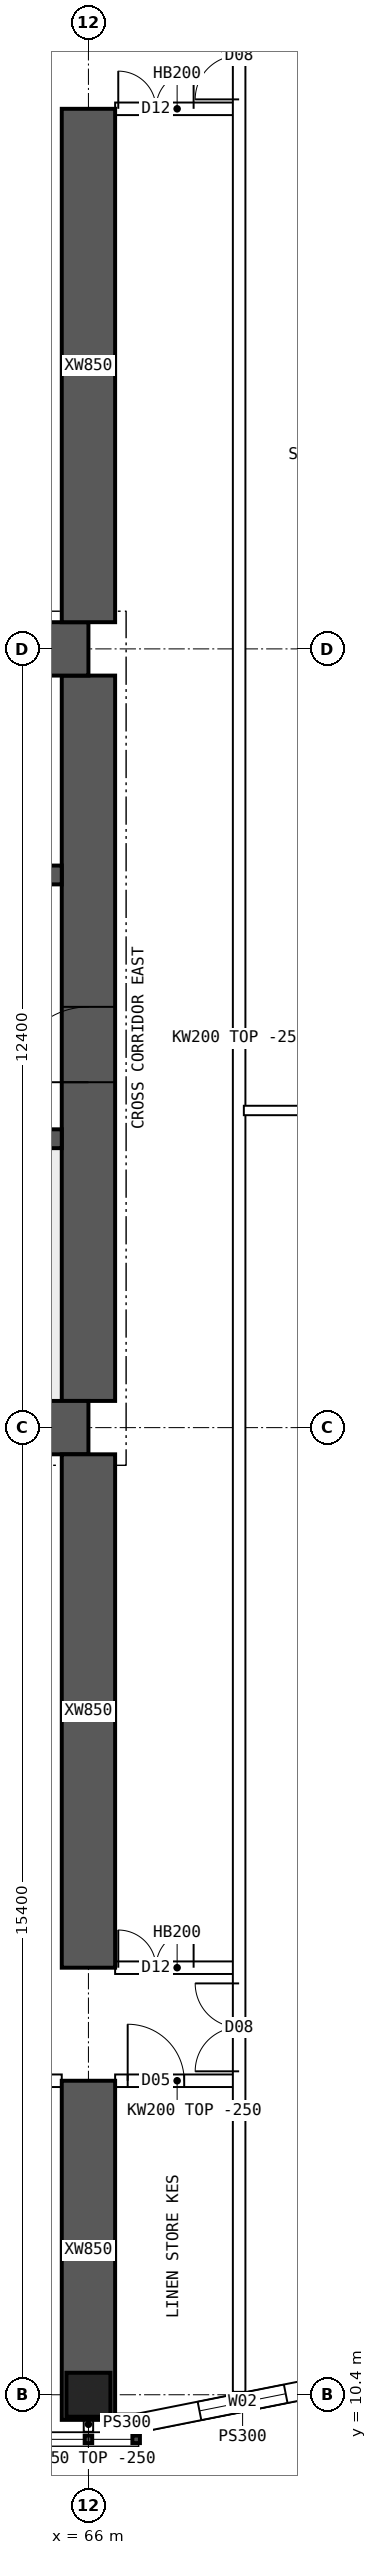
"""IFC4 building model, lengths in metres.
Left out: names, types, materials, properties, quantities, classifications, styles, units other than length and angle.
Written with IfcOpenShell. Run it as: python <this file> out.ifc"""

import sys

from ifc_helpers import new_model, si_unit, direction, frame, frame_2d, origin, origin_2d, place, context, subcontext, project, spatial, polyline, rectangle, hollow_rectangle, outline, extrude, element, fill, save


model = new_model("IFC4")
c1 = context("Model", 3, precision=1e-05, world=origin(), true_north=direction((0.0, 1.0)))
c2 = subcontext(c1, "Body", "Model", "MODEL_VIEW")
j1 = project(units=[si_unit("LENGTHUNIT", "METRE"), si_unit("PLANEANGLEUNIT", "RADIAN")], contexts=[c1])
p1 = place(None, origin())
s1 = spatial("IfcSite", under=j1, at=p1, CompositionType="ELEMENT")
p2 = place(p1, origin())
s2 = spatial("IfcBuilding", under=s1, at=p2, CompositionType="ELEMENT")
p3 = place(p2, frame((0.0, 0.0, 186.1)))
s3 = spatial("IfcBuildingStorey", under=s2, at=p3, CompositionType="ELEMENT", Elevation=186.1)
p4 = place(p3, frame((66.0, 10.4, 0.0), z_axis=(0.0, 0.0, 1.0), x_axis=(1.0, 0.0, 0.0)))
e1 = element("IfcColumn", 1, at=p4, inside=s3, PredefinedType="COLUMN", context=c2, shape_type="SweptSolid", body=[
    extrude(hollow_rectangle(XDim=0.7, YDim=0.7, WallThickness=0.07, at=origin_2d()), origin(), (0.0, 0.0, 1.0), 3.75),
])
for number, where, z_axis, x_axis in (
    (2, (18.0, 25.8, 0.0), (0.0, 0.0, 1.0), (1.0, 0.0, 0.0)),
    (3, (18.0, 38.2, 0.0), (0.0, 0.0, 1.0), (1.0, 0.0, 0.0)),
):
    element("IfcWall", number, at=place(p3, frame(where, z_axis=z_axis, x_axis=x_axis)), inside=s3, PredefinedType="SHEAR", context=c2, shape_type="SweptSolid", body=[
        extrude(rectangle(XDim=48.0, YDim=0.85, at=frame_2d((24.0, 0.0))), origin(), (0.0, 0.0, 1.0), 3.75),
    ])
p5 = place(p3, frame((66.0, 26.225, 0.0), z_axis=(0.0, 0.0, 1.0), x_axis=(0.0, 1.0, 0.0)))
e4 = element("IfcWall", 4, at=p5, inside=s3, PredefinedType="SHEAR", context=c2, shape_type="SweptSolid", body=[
    extrude(rectangle(XDim=11.55, YDim=0.85, at=frame_2d((5.775, 0.0))), origin(), (0.0, 0.0, 1.0), 3.75),
])
p6 = place(p5, frame((5.075, 0.0, 0.0)))
e5 = element("IfcOpeningElement", 5, at=p6, cuts=e4, PredefinedType="OPENING", context=c2, shape_type="SweptSolid", body=[
    extrude(rectangle(XDim=1.2, YDim=2.1, at=frame_2d((0.6, 1.05))), frame((0.0, 0.435, 0.0), z_axis=(0.0, -1.0, 0.0), x_axis=(1.0, 0.0, 0.0)), (0.0, 0.0, 1.0), 0.87),
])
p7 = place(p3, frame((18.425, 30.4, 0.0), z_axis=(0.0, 0.0, 1.0), x_axis=(1.0, 0.0, 0.0)))
e6 = element("IfcWall", 6, at=p7, inside=s3, PredefinedType="SHEAR", context=c2, shape_type="SweptSolid", body=[
    extrude(rectangle(XDim=47.15, YDim=0.3, at=frame_2d((23.575, 0.0))), origin(), (0.0, 0.0, 1.0), 3.75),
])
p8 = place(p7, frame((0.4, 0.0, 0.0)))
e7 = element("IfcOpeningElement", 7, at=p8, cuts=e6, PredefinedType="OPENING", context=c2, shape_type="SweptSolid", body=[
    extrude(rectangle(XDim=1.0, YDim=2.1, at=frame_2d((0.5, 1.05))), frame((0.0, 0.16, 0.0), z_axis=(0.0, -1.0, 0.0), x_axis=(1.0, 0.0, 0.0)), (0.0, 0.0, 1.0), 0.32),
])
p9 = place(p7, frame((45.75, 0.0, 0.0)))
e8 = element("IfcOpeningElement", 8, at=p9, cuts=e6, PredefinedType="OPENING", context=c2, shape_type="SweptSolid", body=[
    extrude(rectangle(XDim=1.0, YDim=2.1, at=frame_2d((0.5, 1.05))), frame((0.0, 0.16, 0.0), z_axis=(0.0, -1.0, 0.0), x_axis=(1.0, 0.0, 0.0)), (0.0, 0.0, 1.0), 0.32),
])
p10 = place(p7, frame((8.325, 0.0, 0.0)))
e9 = element("IfcOpeningElement", 9, at=p10, cuts=e6, PredefinedType="OPENING", context=c2, shape_type="SweptSolid", body=[
    extrude(rectangle(XDim=1.1, YDim=2.1, at=frame_2d((0.55, 1.05))), frame((0.0, 0.16, 0.0), z_axis=(0.0, -1.0, 0.0), x_axis=(1.0, 0.0, 0.0)), (0.0, 0.0, 1.0), 0.32),
])
p11 = place(p7, frame((10.925, 0.0, 0.0)))
e10 = element("IfcOpeningElement", 10, at=p11, cuts=e6, PredefinedType="OPENING", context=c2, shape_type="SweptSolid", body=[
    extrude(rectangle(XDim=1.1, YDim=2.1, at=frame_2d((0.55, 1.05))), frame((0.0, 0.16, 0.0), z_axis=(0.0, -1.0, 0.0), x_axis=(1.0, 0.0, 0.0)), (0.0, 0.0, 1.0), 0.32),
])
p12 = place(p7, frame((13.525, 0.0, 0.0)))
e11 = element("IfcOpeningElement", 11, at=p12, cuts=e6, PredefinedType="OPENING", context=c2, shape_type="SweptSolid", body=[
    extrude(rectangle(XDim=1.1, YDim=2.1, at=frame_2d((0.55, 1.05))), frame((0.0, 0.16, 0.0), z_axis=(0.0, -1.0, 0.0), x_axis=(1.0, 0.0, 0.0)), (0.0, 0.0, 1.0), 0.32),
])
p13 = place(p7, frame((16.125, 0.0, 0.0)))
e12 = element("IfcOpeningElement", 12, at=p13, cuts=e6, PredefinedType="OPENING", context=c2, shape_type="SweptSolid", body=[
    extrude(rectangle(XDim=1.1, YDim=2.1, at=frame_2d((0.55, 1.05))), frame((0.0, 0.16, 0.0), z_axis=(0.0, -1.0, 0.0), x_axis=(1.0, 0.0, 0.0)), (0.0, 0.0, 1.0), 0.32),
])
p14 = place(p7, frame((18.9, 0.0, 0.0)))
e13 = element("IfcOpeningElement", 13, at=p14, cuts=e6, PredefinedType="OPENING", context=c2, shape_type="SweptSolid", body=[
    extrude(rectangle(XDim=0.9, YDim=2.1, at=frame_2d((0.45, 1.05))), frame((0.0, 0.16, 0.0), z_axis=(0.0, -1.0, 0.0), x_axis=(1.0, 0.0, 0.0)), (0.0, 0.0, 1.0), 0.32),
])
p15 = place(p7, frame((30.192, 0.0, 0.0)))
e14 = element("IfcOpeningElement", 14, at=p15, cuts=e6, PredefinedType="OPENING", context=c2, shape_type="SweptSolid", body=[
    extrude(rectangle(XDim=1.1, YDim=2.1, at=frame_2d((0.55, 1.05))), frame((0.0, 0.16, 0.0), z_axis=(0.0, -1.0, 0.0), x_axis=(1.0, 0.0, 0.0)), (0.0, 0.0, 1.0), 0.32),
])
p16 = place(p7, frame((33.725, 0.0, 0.0)))
e15 = element("IfcOpeningElement", 15, at=p16, cuts=e6, PredefinedType="OPENING", context=c2, shape_type="SweptSolid", body=[
    extrude(rectangle(XDim=1.1, YDim=2.1, at=frame_2d((0.55, 1.05))), frame((0.0, 0.16, 0.0), z_axis=(0.0, -1.0, 0.0), x_axis=(1.0, 0.0, 0.0)), (0.0, 0.0, 1.0), 0.32),
])
p17 = place(p7, frame((37.258, 0.0, 0.0)))
e16 = element("IfcOpeningElement", 16, at=p17, cuts=e6, PredefinedType="OPENING", context=c2, shape_type="SweptSolid", body=[
    extrude(rectangle(XDim=1.1, YDim=2.1, at=frame_2d((0.55, 1.05))), frame((0.0, 0.16, 0.0), z_axis=(0.0, -1.0, 0.0), x_axis=(1.0, 0.0, 0.0)), (0.0, 0.0, 1.0), 0.32),
])
p18 = place(p3, frame((18.425, 34.6, 0.0), z_axis=(0.0, 0.0, 1.0), x_axis=(1.0, 0.0, 0.0)))
e17 = element("IfcWall", 17, at=p18, inside=s3, PredefinedType="SHEAR", context=c2, shape_type="SweptSolid", body=[
    extrude(rectangle(XDim=47.15, YDim=0.3, at=frame_2d((23.575, 0.0))), origin(), (0.0, 0.0, 1.0), 3.75),
])
p19 = place(p18, frame((0.9, 0.0, 0.0)))
e18 = element("IfcOpeningElement", 18, at=p19, cuts=e17, PredefinedType="OPENING", context=c2, shape_type="SweptSolid", body=[
    extrude(rectangle(XDim=1.1, YDim=2.1, at=frame_2d((0.55, 1.05))), frame((0.0, 0.16, 0.0), z_axis=(0.0, -1.0, 0.0), x_axis=(1.0, 0.0, 0.0)), (0.0, 0.0, 1.0), 0.32),
])
p20 = place(p18, frame((45.15, 0.0, 0.0)))
e19 = element("IfcOpeningElement", 19, at=p20, cuts=e17, PredefinedType="OPENING", context=c2, shape_type="SweptSolid", body=[
    extrude(rectangle(XDim=1.1, YDim=2.1, at=frame_2d((0.55, 1.05))), frame((0.0, 0.16, 0.0), z_axis=(0.0, -1.0, 0.0), x_axis=(1.0, 0.0, 0.0)), (0.0, 0.0, 1.0), 0.32),
])
p21 = place(p18, frame((4.175, 0.0, 0.0)))
e20 = element("IfcOpeningElement", 20, at=p21, cuts=e17, PredefinedType="OPENING", context=c2, shape_type="SweptSolid", body=[
    extrude(rectangle(XDim=0.9, YDim=2.1, at=frame_2d((0.45, 1.05))), frame((0.0, 0.16, 0.0), z_axis=(0.0, -1.0, 0.0), x_axis=(1.0, 0.0, 0.0)), (0.0, 0.0, 1.0), 0.32),
])
p22 = place(p18, frame((42.075, 0.0, 0.0)))
e21 = element("IfcOpeningElement", 21, at=p22, cuts=e17, PredefinedType="OPENING", context=c2, shape_type="SweptSolid", body=[
    extrude(rectangle(XDim=0.9, YDim=2.1, at=frame_2d((0.45, 1.05))), frame((0.0, 0.16, 0.0), z_axis=(0.0, -1.0, 0.0), x_axis=(1.0, 0.0, 0.0)), (0.0, 0.0, 1.0), 0.32),
])
p23 = place(p18, frame((8.95, 0.0, 0.0)))
e22 = element("IfcOpeningElement", 22, at=p23, cuts=e17, PredefinedType="OPENING", context=c2, shape_type="SweptSolid", body=[
    extrude(rectangle(XDim=0.9, YDim=2.1, at=frame_2d((0.45, 1.05))), frame((0.0, 0.16, 0.0), z_axis=(0.0, -1.0, 0.0), x_axis=(1.0, 0.0, 0.0)), (0.0, 0.0, 1.0), 0.32),
])
p24 = place(p18, frame((12.924, 0.0, 0.0)))
e23 = element("IfcOpeningElement", 23, at=p24, cuts=e17, PredefinedType="OPENING", context=c2, shape_type="SweptSolid", body=[
    extrude(rectangle(XDim=0.9, YDim=2.1, at=frame_2d((0.45, 1.05))), frame((0.0, 0.16, 0.0), z_axis=(0.0, -1.0, 0.0), x_axis=(1.0, 0.0, 0.0)), (0.0, 0.0, 1.0), 0.32),
])
p25 = place(p18, frame((16.571, 0.0, 0.0)))
e24 = element("IfcOpeningElement", 24, at=p25, cuts=e17, PredefinedType="OPENING", context=c2, shape_type="SweptSolid", body=[
    extrude(rectangle(XDim=0.9, YDim=2.1, at=frame_2d((0.45, 1.05))), frame((0.0, 0.16, 0.0), z_axis=(0.0, -1.0, 0.0), x_axis=(1.0, 0.0, 0.0)), (0.0, 0.0, 1.0), 0.32),
])
p26 = place(p18, frame((20.33, 0.0, 0.0)))
e25 = element("IfcOpeningElement", 25, at=p26, cuts=e17, PredefinedType="OPENING", context=c2, shape_type="SweptSolid", body=[
    extrude(rectangle(XDim=0.9, YDim=2.1, at=frame_2d((0.45, 1.05))), frame((0.0, 0.16, 0.0), z_axis=(0.0, -1.0, 0.0), x_axis=(1.0, 0.0, 0.0)), (0.0, 0.0, 1.0), 0.32),
])
p27 = place(p18, frame((24.736, 0.0, 0.0)))
e26 = element("IfcOpeningElement", 26, at=p27, cuts=e17, PredefinedType="OPENING", context=c2, shape_type="SweptSolid", body=[
    extrude(rectangle(XDim=0.9, YDim=2.1, at=frame_2d((0.45, 1.05))), frame((0.0, 0.16, 0.0), z_axis=(0.0, -1.0, 0.0), x_axis=(1.0, 0.0, 0.0)), (0.0, 0.0, 1.0), 0.32),
])
p28 = place(p18, frame((27.533, 0.0, 0.0)))
e27 = element("IfcOpeningElement", 27, at=p28, cuts=e17, PredefinedType="OPENING", context=c2, shape_type="SweptSolid", body=[
    extrude(rectangle(XDim=0.9, YDim=2.1, at=frame_2d((0.45, 1.05))), frame((0.0, 0.16, 0.0), z_axis=(0.0, -1.0, 0.0), x_axis=(1.0, 0.0, 0.0)), (0.0, 0.0, 1.0), 0.32),
])
p29 = place(p18, frame((30.716, 0.0, 0.0)))
e28 = element("IfcOpeningElement", 28, at=p29, cuts=e17, PredefinedType="OPENING", context=c2, shape_type="SweptSolid", body=[
    extrude(rectangle(XDim=0.9, YDim=2.1, at=frame_2d((0.45, 1.05))), frame((0.0, 0.16, 0.0), z_axis=(0.0, -1.0, 0.0), x_axis=(1.0, 0.0, 0.0)), (0.0, 0.0, 1.0), 0.32),
])
p30 = place(p18, frame((34.667, 0.0, 0.0)))
e29 = element("IfcOpeningElement", 29, at=p30, cuts=e17, PredefinedType="OPENING", context=c2, shape_type="SweptSolid", body=[
    extrude(rectangle(XDim=0.9, YDim=2.1, at=frame_2d((0.45, 1.05))), frame((0.0, 0.16, 0.0), z_axis=(0.0, -1.0, 0.0), x_axis=(1.0, 0.0, 0.0)), (0.0, 0.0, 1.0), 0.32),
])
p31 = place(p18, frame((37.605, 0.0, 0.0)))
e30 = element("IfcOpeningElement", 30, at=p31, cuts=e17, PredefinedType="OPENING", context=c2, shape_type="SweptSolid", body=[
    extrude(rectangle(XDim=0.9, YDim=2.1, at=frame_2d((0.45, 1.05))), frame((0.0, 0.16, 0.0), z_axis=(0.0, -1.0, 0.0), x_axis=(1.0, 0.0, 0.0)), (0.0, 0.0, 1.0), 0.32),
])
p32 = place(p3, frame((66.0, 10.0, 0.0), z_axis=(0.0, 0.0, 1.0), x_axis=(0.0, 1.0, 0.0)))
e31 = element("IfcWall", 31, at=p32, inside=s3, PredefinedType="SHEAR", context=c2, shape_type="SweptSolid", body=[
    extrude(rectangle(XDim=5.4, YDim=0.85, at=frame_2d((2.7, 0.0))), origin(), (0.0, 0.0, 1.0), 3.75),
])
for number, where, z_axis, x_axis in (
    (32, (66.0, 17.2, 0.0), (0.0, 0.0, 1.0), (0.0, 1.0, 0.0)),
    (33, (66.0, 38.625, 0.0), (0.0, 0.0, 1.0), (0.0, 1.0, 0.0)),
):
    element("IfcWall", number, at=place(p3, frame(where, z_axis=z_axis, x_axis=x_axis)), inside=s3, PredefinedType="SHEAR", context=c2, shape_type="SweptSolid", body=[
        extrude(rectangle(XDim=8.175, YDim=0.85, at=frame_2d((4.087, 0.0))), origin(), (0.0, 0.0, 1.0), 3.75),
    ])
p33 = place(p3, frame((66.8, 9.95, 0.0), z_axis=(0.0, 0.0, 1.0), x_axis=(0.98078325777, 0.195100490205, 0.0)))
e34 = element("IfcWall", 34, at=p33, inside=s3, PredefinedType="SOLIDWALL", context=c2, shape_type="SweptSolid", body=[
    extrude(outline(polyline([(-0.03, -0.15), (3.405, -0.15), (3.345, 0.15), (0.03, 0.15), (-0.03, -0.15)])), origin(), (0.0, 0.0, 1.0), 3.5),
])
p34 = place(p33, frame((0.988, 0.0, 0.9)))
e35 = element("IfcOpeningElement", 35, at=p34, cuts=e34, PredefinedType="OPENING", context=c2, shape_type="SweptSolid", body=[
    extrude(rectangle(XDim=1.4, YDim=1.8, at=frame_2d((0.7, 0.9))), frame((0.0, 0.16, 0.0), z_axis=(0.0, -1.0, 0.0), x_axis=(1.0, 0.0, 0.0)), (0.0, 0.0, 1.0), 0.32),
])
p35 = place(p3, frame((66.8, 9.95, 0.0), z_axis=(0.0, 0.0, 1.0), x_axis=(-1.0, 0.0, 0.0)))
e36 = element("IfcWall", 36, at=p35, inside=s3, PredefinedType="SOLIDWALL", context=c2, shape_type="SweptSolid", body=[
    extrude(rectangle(XDim=0.375, YDim=0.3, at=frame_2d((0.188, 0.0))), origin(), (0.0, 0.0, 1.0), 3.5),
])
p36 = place(p3, frame((60.425, 15.4, 0.0), z_axis=(0.0, 0.0, 1.0), x_axis=(1.0, 0.0, 0.0)))
e37 = element("IfcWall", 37, at=p36, inside=s3, PredefinedType="SOLIDWALL", context=c2, shape_type="SweptSolid", body=[
    extrude(outline(polyline([(0.0, 0.0), (5.15, 0.0), (5.15, 3.1), (0.0, 3.1), (0.0, 0.0)])), frame((0.0, 0.1, 0.0), z_axis=(0.0, -1.0, 0.0), x_axis=(1.0, 0.0, 0.0)), (0.0, 0.0, 1.0), 0.2),
])
p37 = place(p36, frame((0.1, 0.0, 0.0)))
e38 = element("IfcOpeningElement", 38, at=p37, cuts=e37, PredefinedType="OPENING", context=c2, shape_type="SweptSolid", body=[
    extrude(rectangle(XDim=0.9, YDim=2.1, at=frame_2d((0.45, 1.05))), frame((0.0, 0.11, 0.0), z_axis=(0.0, -1.0, 0.0), x_axis=(1.0, 0.0, 0.0)), (0.0, 0.0, 1.0), 0.22),
])
p38 = place(p36, frame((3.95, 0.0, 0.0)))
e39 = element("IfcOpeningElement", 39, at=p38, cuts=e37, PredefinedType="OPENING", context=c2, shape_type="SweptSolid", body=[
    extrude(rectangle(XDim=0.9, YDim=2.1, at=frame_2d((0.45, 1.05))), frame((0.0, 0.11, 0.0), z_axis=(0.0, -1.0, 0.0), x_axis=(1.0, 0.0, 0.0)), (0.0, 0.0, 1.0), 0.22),
])
p39 = place(p3, frame((66.425, 15.4, 0.0), z_axis=(0.0, 0.0, 1.0), x_axis=(1.0, 0.0, 0.0)))
e40 = element("IfcWall", 40, at=p39, inside=s3, PredefinedType="SOLIDWALL", context=c2, shape_type="SweptSolid", body=[
    extrude(rectangle(XDim=1.975, YDim=0.2, at=frame_2d((0.987, 0.0))), origin(), (0.0, 0.0, 1.0), 3.5),
])
p40 = place(p39, frame((0.2, 0.0, 0.0)))
e41 = element("IfcOpeningElement", 41, at=p40, cuts=e40, PredefinedType="OPENING", context=c2, shape_type="SweptSolid", body=[
    extrude(rectangle(XDim=0.9, YDim=2.1, at=frame_2d((0.45, 1.05))), frame((0.0, 0.11, 0.0), z_axis=(0.0, -1.0, 0.0), x_axis=(1.0, 0.0, 0.0)), (0.0, 0.0, 1.0), 0.22),
])
p41 = place(p3, frame((66.425, 17.2, 0.0), z_axis=(0.0, 0.0, 1.0), x_axis=(1.0, 0.0, 0.0)))
e42 = element("IfcWall", 42, at=p41, inside=s3, PredefinedType="SOLIDWALL", context=c2, shape_type="SweptSolid", body=[
    extrude(rectangle(XDim=1.975, YDim=0.2, at=frame_2d((0.987, 0.0))), origin(), (0.0, 0.0, 1.0), 3.5),
])
p42 = place(p41, frame((0.05, 0.0, 0.0)))
e43 = element("IfcOpeningElement", 43, at=p42, cuts=e42, PredefinedType="OPENING", context=c2, shape_type="SweptSolid", body=[
    extrude(rectangle(XDim=1.2, YDim=2.1, at=frame_2d((0.6, 1.05))), frame((0.0, 0.11, 0.0), z_axis=(0.0, -1.0, 0.0), x_axis=(1.0, 0.0, 0.0)), (0.0, 0.0, 1.0), 0.22),
])
p43 = place(p3, frame((66.425, 46.8, 0.0), z_axis=(0.0, 0.0, 1.0), x_axis=(1.0, 0.0, 0.0)))
e44 = element("IfcWall", 44, at=p43, inside=s3, PredefinedType="SOLIDWALL", context=c2, shape_type="SweptSolid", body=[
    extrude(rectangle(XDim=1.975, YDim=0.2, at=frame_2d((0.987, 0.0))), origin(), (0.0, 0.0, 1.0), 3.5),
])
p44 = place(p43, frame((0.05, 0.0, 0.0)))
e45 = element("IfcOpeningElement", 45, at=p44, cuts=e44, PredefinedType="OPENING", context=c2, shape_type="SweptSolid", body=[
    extrude(rectangle(XDim=1.2, YDim=2.1, at=frame_2d((0.6, 1.05))), frame((0.0, 0.11, 0.0), z_axis=(0.0, -1.0, 0.0), x_axis=(1.0, 0.0, 0.0)), (0.0, 0.0, 1.0), 0.22),
])
p45 = place(p3, frame((68.475, 30.85, 0.0), z_axis=(0.0, 0.0, 1.0), x_axis=(1.0, 0.0, 0.0)))
e46 = element("IfcWall", 46, at=p45, inside=s3, PredefinedType="PARTITIONING", context=c2, shape_type="SweptSolid", body=[
    extrude(outline(polyline([(0.0, 0.0), (6.82, 0.0), (6.82, 3.5), (3.827, 3.5), (3.825, 3.05), (3.227, 3.05), (3.225, 3.5), (0.0, 3.5), (0.0, 0.0)])), frame((0.0, 0.075, 0.0), z_axis=(0.0, -1.0, 0.0), x_axis=(1.0, 0.0, 0.0)), (0.0, 0.0, 1.0), 0.15),
])
p46 = place(p3, frame((68.4, 10.446, 0.0), z_axis=(0.0, 0.0, 1.0), x_axis=(0.0, 1.0, 0.0)))
e47 = element("IfcWall", 47, at=p46, inside=s3, PredefinedType="SOLIDWALL", context=c2, shape_type="SweptSolid", body=[
    extrude(rectangle(XDim=43.107, YDim=0.2, at=frame_2d((21.554, 0.0))), origin(), (0.0, 0.0, 1.0), 3.5),
])
p47 = place(p46, frame((5.104, 0.0, 0.0)))
e48 = element("IfcOpeningElement", 48, at=p47, cuts=e47, PredefinedType="OPENING", context=c2, shape_type="SweptSolid", body=[
    extrude(rectangle(XDim=1.4, YDim=2.1, at=frame_2d((0.7, 1.05))), frame((0.0, 0.11, 0.0), z_axis=(0.0, -1.0, 0.0), x_axis=(1.0, 0.0, 0.0)), (0.0, 0.0, 1.0), 0.22),
])
p48 = place(p46, frame((36.504, 0.0, 0.0)))
e49 = element("IfcOpeningElement", 49, at=p48, cuts=e47, PredefinedType="OPENING", context=c2, shape_type="SweptSolid", body=[
    extrude(rectangle(XDim=1.4, YDim=2.1, at=frame_2d((0.7, 1.05))), frame((0.0, 0.11, 0.0), z_axis=(0.0, -1.0, 0.0), x_axis=(1.0, 0.0, 0.0)), (0.0, 0.0, 1.0), 0.22),
])
p49 = place(p3, frame((66.0, 10.05, 0.0), z_axis=(0.0, 0.0, 1.0), x_axis=(0.0, -1.0, 0.0)))
e50 = element("IfcWall", 50, at=p49, inside=s3, PredefinedType="PARTITIONING", context=c2, shape_type="SweptSolid", body=[
    extrude(rectangle(XDim=0.24, YDim=0.15, at=frame_2d((0.12, 0.0))), origin(), (0.0, 0.0, 1.0), 3.5),
])
p50 = place(p34, origin())
e51 = element("IfcWindow", 51, at=p50, inside=s3, PartitioningType="SINGLE_PANEL", PredefinedType="WINDOW", context=c2, shape_type="SweptSolid", body=[
    extrude(rectangle(XDim=1.4, YDim=1.8, at=frame_2d((0.7, 0.9))), frame((0.0, 0.03, 0.0), z_axis=(0.0, -1.0, 0.0), x_axis=(1.0, 0.0, 0.0)), (0.0, 0.0, 1.0), 0.06),
])
fill(e35, e51)
p51 = place(p6, origin())
e52 = element("IfcDoor", 52, at=p51, inside=s3, OperationType="SINGLE_SWING_LEFT", PredefinedType="DOOR", context=c2, shape_type="SweptSolid", body=[
    extrude(rectangle(XDim=1.2, YDim=2.1, at=frame_2d((0.6, 1.05))), frame((0.0, 0.025, 0.0), z_axis=(0.0, -1.0, 0.0), x_axis=(1.0, 0.0, 0.0)), (0.0, 0.0, 1.0), 0.05),
])
fill(e5, e52)
p52 = place(p42, origin())
e53 = element("IfcDoor", 53, at=p52, inside=s3, OperationType="DOUBLE_DOOR_SINGLE_SWING", PredefinedType="DOOR", context=c2, shape_type="SweptSolid", body=[
    extrude(rectangle(XDim=1.2, YDim=2.1, at=frame_2d((0.6, 1.05))), frame((0.0, 0.025, 0.0), z_axis=(0.0, -1.0, 0.0), x_axis=(1.0, 0.0, 0.0)), (0.0, 0.0, 1.0), 0.05),
])
fill(e43, e53)
p53 = place(p44, origin())
e54 = element("IfcDoor", 54, at=p53, inside=s3, OperationType="DOUBLE_DOOR_SINGLE_SWING", PredefinedType="DOOR", context=c2, shape_type="SweptSolid", body=[
    extrude(rectangle(XDim=1.2, YDim=2.1, at=frame_2d((0.6, 1.05))), frame((0.0, 0.025, 0.0), z_axis=(0.0, -1.0, 0.0), x_axis=(1.0, 0.0, 0.0)), (0.0, 0.0, 1.0), 0.05),
])
fill(e45, e54)
p54 = place(p47, origin())
e55 = element("IfcDoor", 55, at=p54, inside=s3, OperationType="DOUBLE_DOOR_SINGLE_SWING", PredefinedType="DOOR", context=c2, shape_type="SweptSolid", body=[
    extrude(rectangle(XDim=1.4, YDim=2.1, at=frame_2d((0.7, 1.05))), frame((0.0, 0.025, 0.0), z_axis=(0.0, -1.0, 0.0), x_axis=(1.0, 0.0, 0.0)), (0.0, 0.0, 1.0), 0.05),
])
fill(e48, e55)
p55 = place(p48, origin())
e56 = element("IfcDoor", 56, at=p55, inside=s3, OperationType="DOUBLE_DOOR_SINGLE_SWING", PredefinedType="DOOR", context=c2, shape_type="SweptSolid", body=[
    extrude(rectangle(XDim=1.4, YDim=2.1, at=frame_2d((0.7, 1.05))), frame((0.0, 0.025, 0.0), z_axis=(0.0, -1.0, 0.0), x_axis=(1.0, 0.0, 0.0)), (0.0, 0.0, 1.0), 0.05),
])
fill(e49, e56)
p56 = place(p40, origin())
e57 = element("IfcDoor", 57, at=p56, inside=s3, OperationType="SINGLE_SWING_LEFT", PredefinedType="DOOR", context=c2, shape_type="SweptSolid", body=[
    extrude(rectangle(XDim=0.9, YDim=2.1, at=frame_2d((0.45, 1.05))), frame((0.0, 0.025, 0.0), z_axis=(0.0, -1.0, 0.0), x_axis=(1.0, 0.0, 0.0)), (0.0, 0.0, 1.0), 0.05),
])
fill(e41, e57)
save(model, sys.argv[1])
